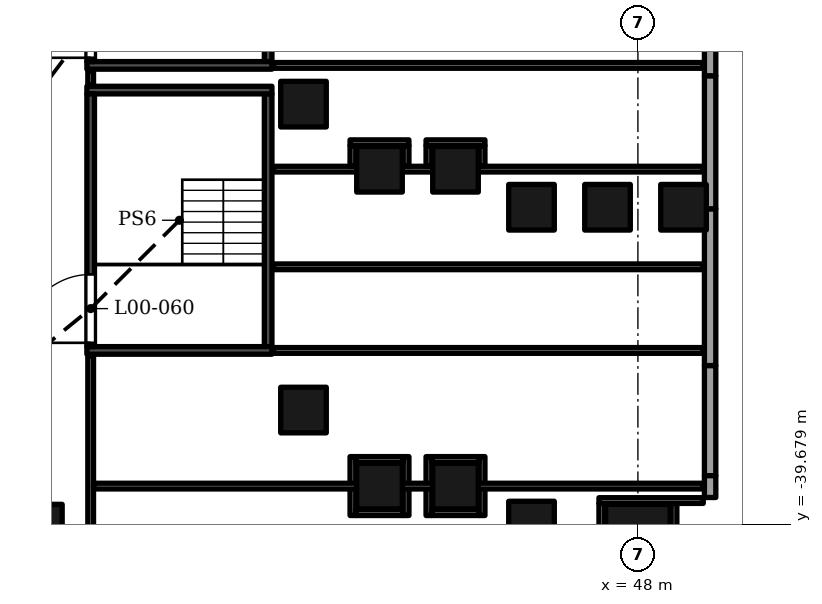
"""IFC4 building model, lengths in metres.
Left out: names, types, materials, properties, quantities, classifications, styles, units other than length and angle.
Written with IfcOpenShell. Run it as: python <this file> out.ifc"""

import sys

from ifc_helpers import new_model, si_unit, direction, frame, frame_2d, origin, origin_2d, place, context, subcontext, project, spatial, rectangle, extrude, element, fill, save


model = new_model("IFC4")
c1 = context("Model", 3, precision=1e-05, world=origin(), true_north=direction((0.0, 1.0)))
c2 = subcontext(c1, "Body", "Model", "MODEL_VIEW")
j1 = project(units=[si_unit("LENGTHUNIT", "METRE"), si_unit("PLANEANGLEUNIT", "RADIAN")], contexts=[c1])
p1 = place(None, origin())
s1 = spatial("IfcSite", under=j1, at=p1, CompositionType="ELEMENT")
p2 = place(p1, origin())
s2 = spatial("IfcBuilding", under=s1, at=p2, CompositionType="ELEMENT")
p3 = place(p2, origin())
s3 = spatial("IfcBuildingStorey", under=s2, at=p3, CompositionType="ELEMENT", Elevation=0.0)
for number, where, z_axis, x_axis in (
    (1, (32.0, -40.0, 0.0), (0.0, 0.0, 1.0), (1.0, 0.0, 0.0)),
    (2, (48.0, -40.0, 0.0), (0.0, 0.0, 1.0), (1.0, 0.0, 0.0)),
):
    element("IfcColumn", number, at=place(p3, frame(where, z_axis=z_axis, x_axis=x_axis)), inside=s3, PredefinedType="COLUMN", context=c2, shape_type="SweptSolid", body=[
        extrude(rectangle(XDim=1.7, YDim=1.7, at=origin_2d()), origin(), (0.0, 0.0, 1.0), 9.0),
    ])
for number, where, z_axis, x_axis in (
    (3, (39.2, -36.669, 0.0), (0.0, 0.0, 1.0), (1.0, 0.0, 0.0)),
    (4, (39.2, -28.62, 0.0), (0.0, 0.0, 1.0), (1.0, 0.0, 0.0)),
    (5, (41.2, -38.669, 0.0), (0.0, 0.0, 1.0), (1.0, 0.0, 0.0)),
    (6, (41.2, -30.333, 0.0), (0.0, 0.0, 1.0), (1.0, 0.0, 0.0)),
    (7, (43.2, -38.669, 0.0), (0.0, 0.0, 1.0), (1.0, 0.0, 0.0)),
    (8, (43.2, -30.333, 0.0), (0.0, 0.0, 1.0), (1.0, 0.0, 0.0)),
    (9, (45.2, -39.669, 0.0), (0.0, 0.0, 1.0), (1.0, 0.0, 0.0)),
    (10, (45.2, -31.333, 0.0), (0.0, 0.0, 1.0), (1.0, 0.0, 0.0)),
    (11, (47.2, -31.333, 0.0), (0.0, 0.0, 1.0), (1.0, 0.0, 0.0)),
    (12, (49.2, -31.333, 0.0), (0.0, 0.0, 1.0), (1.0, 0.0, 0.0)),
):
    element("IfcColumn", number, at=place(p3, frame(where, z_axis=z_axis, x_axis=x_axis)), inside=s3, PredefinedType="COLUMN", context=c2, shape_type="SweptSolid", body=[
        extrude(rectangle(XDim=1.2, YDim=1.2, at=origin_2d()), origin(), (0.0, 0.0, 1.0), 9.0),
    ])
p4 = place(p3, frame((49.9, -38.396, 0.0), z_axis=(0.0, 0.0, 1.0), x_axis=(0.0, 1.0, 0.0)))
e13 = element("IfcWall", 13, at=p4, inside=s3, PredefinedType="ELEMENTEDWALL", context=c2, shape_type="SweptSolid", body=[
    extrude(rectangle(XDim=2.898, YDim=0.3, at=frame_2d((1.449, 0.0))), origin(), (0.0, 0.0, 1.0), 7.6),
])
p5 = place(p4, frame((0.4, 0.0, 0.0)))
e14 = element("IfcOpeningElement", 14, at=p5, cuts=e13, PredefinedType="OPENING", context=c2, shape_type="SweptSolid", body=[
    extrude(rectangle(XDim=2.0, YDim=2.7, at=frame_2d((1.0, 1.35))), frame((0.0, 0.16, 0.0), z_axis=(0.0, -1.0, 0.0), x_axis=(1.0, 0.0, 0.0)), (0.0, 0.0, 1.0), 0.32),
])
p6 = place(p3, frame((49.9, -35.498, 0.0), z_axis=(0.0, 0.0, 1.0), x_axis=(0.0, 1.0, 0.0)))
e15 = element("IfcWall", 15, at=p6, inside=s3, PredefinedType="ELEMENTEDWALL", context=c2, shape_type="SweptSolid", body=[
    extrude(rectangle(XDim=4.125, YDim=0.3, at=frame_2d((2.062, 0.0))), origin(), (0.0, 0.0, 1.0), 7.6),
])
p7 = place(p6, frame((0.498, 0.0, 0.0)))
e16 = element("IfcOpeningElement", 16, at=p7, cuts=e15, PredefinedType="OPENING", context=c2, shape_type="SweptSolid", body=[
    extrude(rectangle(XDim=2.0, YDim=2.4, at=frame_2d((1.0, 1.2))), frame((0.0, 0.16, 0.0), z_axis=(0.0, -1.0, 0.0), x_axis=(1.0, 0.0, 0.0)), (0.0, 0.0, 1.0), 0.32),
])
p8 = place(p3, frame((49.9, -31.373, 0.0), z_axis=(0.0, 0.0, 1.0), x_axis=(0.0, 1.0, 0.0)))
e17 = element("IfcWall", 17, at=p8, inside=s3, PredefinedType="ELEMENTEDWALL", context=c2, shape_type="SweptSolid", body=[
    extrude(rectangle(XDim=3.5, YDim=0.3, at=frame_2d((1.75, 0.0))), origin(), (0.0, 0.0, 1.0), 7.6),
])
p9 = place(p8, frame((1.627, 0.0, 0.0)))
e18 = element("IfcOpeningElement", 18, at=p9, cuts=e17, PredefinedType="OPENING", context=c2, shape_type="SweptSolid", body=[
    extrude(rectangle(XDim=1.5, YDim=2.7, at=frame_2d((0.75, 1.35))), frame((0.0, 0.16, 0.0), z_axis=(0.0, -1.0, 0.0), x_axis=(1.0, 0.0, 0.0)), (0.0, 0.0, 1.0), 0.32),
])
p10 = place(p3, frame((49.9, -27.873, 0.0), z_axis=(0.0, 0.0, 1.0), x_axis=(0.0, 1.0, 0.0)))
e19 = element("IfcWall", 19, at=p10, inside=s3, PredefinedType="ELEMENTEDWALL", context=c2, shape_type="SweptSolid", body=[
    extrude(rectangle(XDim=4.375, YDim=0.3, at=frame_2d((2.188, 0.0))), origin(), (0.0, 0.0, 1.0), 7.6),
])
p11 = place(p10, frame((0.373, 0.0, 0.0)))
e20 = element("IfcOpeningElement", 20, at=p11, cuts=e19, PredefinedType="OPENING", context=c2, shape_type="SweptSolid", body=[
    extrude(rectangle(XDim=2.0, YDim=2.4, at=frame_2d((1.0, 1.2))), frame((0.0, 0.16, 0.0), z_axis=(0.0, -1.0, 0.0), x_axis=(1.0, 0.0, 0.0)), (0.0, 0.0, 1.0), 0.32),
])
p12 = place(p3, frame((49.9, -38.97, 0.0), z_axis=(0.0, 0.0, 1.0), x_axis=(0.0, 1.0, 0.0)))
e21 = element("IfcWall", 21, at=p12, inside=s3, PredefinedType="SOLIDWALL", context=c2, shape_type="SweptSolid", body=[
    extrude(rectangle(XDim=0.574, YDim=0.3, at=frame_2d((0.287, 0.0))), origin(), (0.0, 0.0, 1.0), 7.6),
])
p13 = place(p3, frame((49.85, -39.79, 9.0), z_axis=(0.0, 0.0, 1.0), x_axis=(0.0, 1.0, 0.0)))
e22 = element("IfcWall", 22, at=p13, inside=s3, PredefinedType="PARAPET", context=c2, shape_type="SweptSolid", body=[
    extrude(rectangle(XDim=14.698, YDim=0.3, at=frame_2d((7.349, 0.0))), origin(), (0.0, 0.0, 1.0), 1.1),
])
for number, where, z_axis, x_axis in (
    (23, (33.5, -35.1, 0.0), (0.0, 0.0, 1.0), (1.0, 0.0, 0.0)),
    (24, (33.5, -28.25, 0.0), (0.0, 0.0, 1.0), (1.0, 0.0, 0.0)),
):
    element("IfcWall", number, at=place(p3, frame(where, z_axis=z_axis, x_axis=x_axis)), inside=s3, PredefinedType="SOLIDWALL", context=c2, shape_type="SweptSolid", body=[
        extrude(rectangle(XDim=4.87, YDim=0.2, at=frame_2d((2.435, 0.0))), origin(), (0.0, 0.0, 1.0), 8.5),
    ])
p14 = place(p3, frame((33.6, -35.0, 0.0), z_axis=(0.0, 0.0, 1.0), x_axis=(0.0, 1.0, 0.0)))
e25 = element("IfcWall", 25, at=p14, inside=s3, PredefinedType="SOLIDWALL", context=c2, shape_type="SweptSolid", body=[
    extrude(rectangle(XDim=6.65, YDim=0.2, at=frame_2d((3.325, 0.0))), origin(), (0.0, 0.0, 1.0), 8.5),
])
p15 = place(p14, frame((0.1, 0.0, 0.0)))
e26 = element("IfcOpeningElement", 26, at=p15, cuts=e25, PredefinedType="OPENING", context=c2, shape_type="SweptSolid", body=[
    extrude(rectangle(XDim=1.8, YDim=2.4, at=frame_2d((0.9, 1.2))), frame((0.0, 0.11, 0.0), z_axis=(0.0, -1.0, 0.0), x_axis=(1.0, 0.0, 0.0)), (0.0, 0.0, 1.0), 0.22),
])
p16 = place(p3, frame((38.27, -35.0, 0.0), z_axis=(0.0, 0.0, 1.0), x_axis=(0.0, 1.0, 0.0)))
e27 = element("IfcWall", 27, at=p16, inside=s3, PredefinedType="SOLIDWALL", context=c2, shape_type="SweptSolid", body=[
    extrude(rectangle(XDim=6.65, YDim=0.2, at=frame_2d((3.325, 0.0))), origin(), (0.0, 0.0, 1.0), 8.5),
])
p17 = place(p16, frame((0.1, 0.0, 0.0)))
e28 = element("IfcOpeningElement", 28, at=p17, cuts=e27, PredefinedType="OPENING", context=c2, shape_type="SweptSolid", body=[
    extrude(rectangle(XDim=1.8, YDim=2.4, at=frame_2d((0.9, 1.2))), frame((0.0, 0.11, 0.0), z_axis=(0.0, -1.0, 0.0), x_axis=(1.0, 0.0, 0.0)), (0.0, 0.0, 1.0), 0.22),
])
p18 = place(p3, frame((33.5, -27.6, 0.0), z_axis=(0.0, 0.0, 1.0), x_axis=(1.0, 0.0, 0.0)))
e29 = element("IfcWall", 29, at=p18, inside=s3, PredefinedType="SOLIDWALL", context=c2, shape_type="SweptSolid", body=[
    extrude(rectangle(XDim=4.87, YDim=0.2, at=frame_2d((2.435, 0.0))), origin(), (0.0, 0.0, 1.0), 8.5),
])
p19 = place(p3, frame((33.6, -27.5, 0.0), z_axis=(0.0, 0.0, 1.0), x_axis=(0.0, 1.0, 0.0)))
e30 = element("IfcWall", 30, at=p19, inside=s3, PredefinedType="SOLIDWALL", context=c2, shape_type="SweptSolid", body=[
    extrude(rectangle(XDim=6.65, YDim=0.2, at=frame_2d((3.325, 0.0))), origin(), (0.0, 0.0, 1.0), 8.5),
])
p20 = place(p19, frame((0.1, 0.0, 0.0)))
e31 = element("IfcOpeningElement", 31, at=p20, cuts=e30, PredefinedType="OPENING", context=c2, shape_type="SweptSolid", body=[
    extrude(rectangle(XDim=1.8, YDim=2.4, at=frame_2d((0.9, 1.2))), frame((0.0, 0.11, 0.0), z_axis=(0.0, -1.0, 0.0), x_axis=(1.0, 0.0, 0.0)), (0.0, 0.0, 1.0), 0.22),
])
p21 = place(p3, frame((38.27, -27.5, 0.0), z_axis=(0.0, 0.0, 1.0), x_axis=(0.0, 1.0, 0.0)))
e32 = element("IfcWall", 32, at=p21, inside=s3, PredefinedType="SOLIDWALL", context=c2, shape_type="SweptSolid", body=[
    extrude(rectangle(XDim=6.65, YDim=0.2, at=frame_2d((3.325, 0.0))), origin(), (0.0, 0.0, 1.0), 8.5),
])
p22 = place(p21, frame((0.1, 0.0, 0.0)))
e33 = element("IfcOpeningElement", 33, at=p22, cuts=e32, PredefinedType="OPENING", context=c2, shape_type="SweptSolid", body=[
    extrude(rectangle(XDim=1.8, YDim=2.4, at=frame_2d((0.9, 1.2))), frame((0.0, 0.11, 0.0), z_axis=(0.0, -1.0, 0.0), x_axis=(1.0, 0.0, 0.0)), (0.0, 0.0, 1.0), 0.22),
])
p23 = place(p3, frame((33.6, -44.6, 0.0), z_axis=(0.0, 0.0, 1.0), x_axis=(0.0, 1.0, 0.0)))
e34 = element("IfcWall", 34, at=p23, inside=s3, PredefinedType="PARTITIONING", context=c2, shape_type="SweptSolid", body=[
    extrude(rectangle(XDim=9.36, YDim=0.15, at=frame_2d((4.68, 0.0))), origin(), (0.0, 0.0, 1.0), 7.3),
])
p24 = place(p23, frame((6.68, 0.0, 0.0)))
e35 = element("IfcOpeningElement", 35, at=p24, cuts=e34, PredefinedType="OPENING", context=c2, shape_type="SweptSolid", body=[
    extrude(rectangle(XDim=1.2, YDim=2.1, at=frame_2d((0.6, 1.05))), frame((0.0, 0.085, 0.0), z_axis=(0.0, -1.0, 0.0), x_axis=(1.0, 0.0, 0.0)), (0.0, 0.0, 1.0), 0.17),
])
p25 = place(p3, frame((47.05, -40.875, 0.0), z_axis=(0.0, 0.0, 1.0), x_axis=(0.0, 1.0, 0.0)))
e36 = element("IfcWall", 36, at=p25, inside=s3, PredefinedType="PARTITIONING", context=c2, shape_type="SweptSolid", body=[
    extrude(rectangle(XDim=1.75, YDim=0.15, at=frame_2d((0.875, 0.0))), origin(), (0.0, 0.0, 1.0), 7.6),
])
p26 = place(p3, frame((48.95, -40.646, 0.0), z_axis=(0.0, 0.0, 1.0), x_axis=(0.0, 1.0, 0.0)))
e37 = element("IfcWall", 37, at=p26, inside=s3, PredefinedType="PARTITIONING", context=c2, shape_type="SweptSolid", body=[
    extrude(rectangle(XDim=1.521, YDim=0.15, at=frame_2d((0.76, 0.0))), origin(), (0.0, 0.0, 1.0), 8.5),
])
p27 = place(p3, frame((40.5, -39.444, 0.0), z_axis=(0.0, 0.0, 1.0), x_axis=(0.0, 1.0, 0.0)))
e38 = element("IfcWall", 38, at=p27, inside=s3, PredefinedType="PARTITIONING", context=c2, shape_type="SweptSolid", body=[
    extrude(rectangle(XDim=1.55, YDim=0.15, at=frame_2d((0.775, 0.0))), origin(), (0.0, 0.0, 1.0), 8.5),
])
p28 = place(p3, frame((40.575, -39.369, 0.0), z_axis=(0.0, 0.0, 1.0), x_axis=(1.0, 0.0, 0.0)))
e39 = element("IfcWall", 39, at=p28, inside=s3, PredefinedType="PARTITIONING", context=c2, shape_type="SweptSolid", body=[
    extrude(rectangle(XDim=1.25, YDim=0.15, at=frame_2d((0.625, 0.0))), origin(), (0.0, 0.0, 1.0), 8.5),
])
for number, where, z_axis, x_axis in (
    (40, (41.9, -39.444, 0.0), (0.0, 0.0, 1.0), (0.0, 1.0, 0.0)),
    (41, (42.5, -39.444, 0.0), (0.0, 0.0, 1.0), (0.0, 1.0, 0.0)),
):
    element("IfcWall", number, at=place(p3, frame(where, z_axis=z_axis, x_axis=x_axis)), inside=s3, PredefinedType="PARTITIONING", context=c2, shape_type="SweptSolid", body=[
        extrude(rectangle(XDim=1.55, YDim=0.15, at=frame_2d((0.775, 0.0))), origin(), (0.0, 0.0, 1.0), 8.5),
    ])
p29 = place(p3, frame((42.575, -39.369, 0.0), z_axis=(0.0, 0.0, 1.0), x_axis=(1.0, 0.0, 0.0)))
e42 = element("IfcWall", 42, at=p29, inside=s3, PredefinedType="PARTITIONING", context=c2, shape_type="SweptSolid", body=[
    extrude(rectangle(XDim=1.25, YDim=0.15, at=frame_2d((0.625, 0.0))), origin(), (0.0, 0.0, 1.0), 8.5),
])
p30 = place(p3, frame((43.9, -39.444, 0.0), z_axis=(0.0, 0.0, 1.0), x_axis=(0.0, 1.0, 0.0)))
e43 = element("IfcWall", 43, at=p30, inside=s3, PredefinedType="PARTITIONING", context=c2, shape_type="SweptSolid", body=[
    extrude(rectangle(XDim=1.55, YDim=0.15, at=frame_2d((0.775, 0.0))), origin(), (0.0, 0.0, 1.0), 8.5),
])
p31 = place(p3, frame((46.975, -39.05, 0.0), z_axis=(0.0, 0.0, 1.0), x_axis=(1.0, 0.0, 0.0)))
e44 = element("IfcWall", 44, at=p31, inside=s3, PredefinedType="PARTITIONING", context=c2, shape_type="SweptSolid", body=[
    extrude(rectangle(XDim=2.745, YDim=0.15, at=frame_2d((1.373, 0.0))), origin(), (0.0, 0.0, 1.0), 7.6),
])
p32 = place(p3, frame((33.675, -38.67, 0.0), z_axis=(0.0, 0.0, 1.0), x_axis=(1.0, 0.0, 0.0)))
e45 = element("IfcWall", 45, at=p32, inside=s3, PredefinedType="PARTITIONING", context=c2, shape_type="SweptSolid", body=[
    extrude(rectangle(XDim=6.925, YDim=0.15, at=frame_2d((3.462, 0.0))), origin(), (0.0, 0.0, 1.0), 8.5),
])
p33 = place(p3, frame((41.8, -38.67, 0.0), z_axis=(0.0, 0.0, 1.0), x_axis=(1.0, 0.0, 0.0)))
e46 = element("IfcWall", 46, at=p33, inside=s3, PredefinedType="PARTITIONING", context=c2, shape_type="SweptSolid", body=[
    extrude(rectangle(XDim=0.8, YDim=0.15, at=frame_2d((0.4, 0.0))), origin(), (0.0, 0.0, 1.0), 8.5),
])
p34 = place(p3, frame((43.8, -38.67, 0.0), z_axis=(0.0, 0.0, 1.0), x_axis=(1.0, 0.0, 0.0)))
e47 = element("IfcWall", 47, at=p34, inside=s3, PredefinedType="PARTITIONING", context=c2, shape_type="SweptSolid", body=[
    extrude(rectangle(XDim=5.92, YDim=0.15, at=frame_2d((2.96, 0.0))), origin(), (0.0, 0.0, 1.0), 7.6),
])
for number, where, z_axis, x_axis in (
    (48, (40.575, -37.969, 0.0), (0.0, 0.0, 1.0), (1.0, 0.0, 0.0)),
    (49, (42.575, -37.969, 0.0), (0.0, 0.0, 1.0), (1.0, 0.0, 0.0)),
):
    element("IfcWall", number, at=place(p3, frame(where, z_axis=z_axis, x_axis=x_axis)), inside=s3, PredefinedType="PARTITIONING", context=c2, shape_type="SweptSolid", body=[
        extrude(rectangle(XDim=1.25, YDim=0.15, at=frame_2d((0.625, 0.0))), origin(), (0.0, 0.0, 1.0), 8.5),
    ])
p35 = place(p3, frame((38.41, -35.101, 0.0), z_axis=(0.0, 0.0, 1.0), x_axis=(1.0, 0.0, 0.0)))
e50 = element("IfcWall", 50, at=p35, inside=s3, PredefinedType="PARTITIONING", context=c2, shape_type="SweptSolid", body=[
    extrude(rectangle(XDim=11.31, YDim=0.151, at=frame_2d((5.655, 0.0))), origin(), (0.0, 0.0, 1.0), 7.6),
])
p36 = place(p35, frame((5.04, 0.0, 0.0)))
e51 = element("IfcOpeningElement", 51, at=p36, cuts=e50, PredefinedType="OPENING", context=c2, shape_type="SweptSolid", body=[
    extrude(rectangle(XDim=1.2, YDim=2.1, at=frame_2d((0.6, 1.05))), frame((0.0, 0.085, 0.0), z_axis=(0.0, -1.0, 0.0), x_axis=(1.0, 0.0, 0.0)), (0.0, 0.0, 1.0), 0.171),
])
p37 = place(p3, frame((38.41, -32.9, 0.0), z_axis=(0.0, 0.0, 1.0), x_axis=(1.0, 0.0, 0.0)))
e52 = element("IfcWall", 52, at=p37, inside=s3, PredefinedType="PARTITIONING", context=c2, shape_type="SweptSolid", body=[
    extrude(rectangle(XDim=11.31, YDim=0.15, at=frame_2d((5.655, 0.0))), origin(), (0.0, 0.0, 1.0), 7.6),
])
p38 = place(p3, frame((38.41, -30.33, 0.0), z_axis=(0.0, 0.0, 1.0), x_axis=(1.0, 0.0, 0.0)))
e53 = element("IfcWall", 53, at=p38, inside=s3, PredefinedType="PARTITIONING", context=c2, shape_type="SweptSolid", body=[
    extrude(rectangle(XDim=2.19, YDim=0.15, at=frame_2d((1.095, 0.0))), origin(), (0.0, 0.0, 1.0), 8.5),
])
p39 = place(p3, frame((41.8, -30.33, 0.0), z_axis=(0.0, 0.0, 1.0), x_axis=(1.0, 0.0, 0.0)))
e54 = element("IfcWall", 54, at=p39, inside=s3, PredefinedType="PARTITIONING", context=c2, shape_type="SweptSolid", body=[
    extrude(rectangle(XDim=0.8, YDim=0.15, at=frame_2d((0.4, 0.0))), origin(), (0.0, 0.0, 1.0), 8.5),
])
p40 = place(p3, frame((43.8, -30.33, 0.0), z_axis=(0.0, 0.0, 1.0), x_axis=(1.0, 0.0, 0.0)))
e55 = element("IfcWall", 55, at=p40, inside=s3, PredefinedType="PARTITIONING", context=c2, shape_type="SweptSolid", body=[
    extrude(rectangle(XDim=5.92, YDim=0.15, at=frame_2d((2.96, 0.0))), origin(), (0.0, 0.0, 1.0), 7.6),
])
for number, where, z_axis, x_axis in (
    (56, (40.5, -30.255, 0.0), (0.0, 0.0, 1.0), (0.0, 1.0, 0.0)),
    (57, (41.9, -30.255, 0.0), (0.0, 0.0, 1.0), (0.0, 1.0, 0.0)),
    (58, (42.5, -30.255, 0.0), (0.0, 0.0, 1.0), (0.0, 1.0, 0.0)),
    (59, (43.9, -30.255, 0.0), (0.0, 0.0, 1.0), (0.0, 1.0, 0.0)),
):
    element("IfcWall", number, at=place(p3, frame(where, z_axis=z_axis, x_axis=x_axis)), inside=s3, PredefinedType="PARTITIONING", context=c2, shape_type="SweptSolid", body=[
        extrude(rectangle(XDim=0.545, YDim=0.15, at=frame_2d((0.272, 0.0))), origin(), (0.0, 0.0, 1.0), 8.5),
    ])
for number, where, z_axis, x_axis in (
    (60, (40.425, -29.635, 0.0), (0.0, 0.0, 1.0), (1.0, 0.0, 0.0)),
    (61, (42.425, -29.635, 0.0), (0.0, 0.0, 1.0), (1.0, 0.0, 0.0)),
):
    element("IfcWall", number, at=place(p3, frame(where, z_axis=z_axis, x_axis=x_axis)), inside=s3, PredefinedType="PARTITIONING", context=c2, shape_type="SweptSolid", body=[
        extrude(rectangle(XDim=1.55, YDim=0.15, at=frame_2d((0.775, 0.0))), origin(), (0.0, 0.0, 1.0), 8.5),
    ])
p41 = place(p3, frame((33.6, -28.11, 0.0), z_axis=(0.0, 0.0, 1.0), x_axis=(0.0, 1.0, 0.0)))
e62 = element("IfcWall", 62, at=p41, inside=s3, PredefinedType="PARTITIONING", context=c2, shape_type="SweptSolid", body=[
    extrude(rectangle(XDim=0.37, YDim=0.15, at=frame_2d((0.185, 0.0))), origin(), (0.0, 0.0, 1.0), 8.5),
])
p42 = place(p3, frame((38.41, -27.601, 0.0), z_axis=(0.0, 0.0, 1.0), x_axis=(1.0, 0.0, 0.0)))
e63 = element("IfcWall", 63, at=p42, inside=s3, PredefinedType="PARTITIONING", context=c2, shape_type="SweptSolid", body=[
    extrude(rectangle(XDim=11.31, YDim=0.151, at=frame_2d((5.655, 0.0))), origin(), (0.0, 0.0, 1.0), 7.6),
])
p43 = place(p42, frame((5.04, 0.0, 0.0)))
e64 = element("IfcOpeningElement", 64, at=p43, cuts=e63, PredefinedType="OPENING", context=c2, shape_type="SweptSolid", body=[
    extrude(rectangle(XDim=1.2, YDim=2.1, at=frame_2d((0.6, 1.05))), frame((0.0, 0.085, 0.0), z_axis=(0.0, -1.0, 0.0), x_axis=(1.0, 0.0, 0.0)), (0.0, 0.0, 1.0), 0.171),
])
p44 = place(p5, origin())
e65 = element("IfcDoor", 65, at=p44, inside=s3, OperationType="DOUBLE_DOOR_SINGLE_SWING", PredefinedType="DOOR", context=c2, shape_type="SweptSolid", body=[
    extrude(rectangle(XDim=2.0, YDim=2.7, at=frame_2d((1.0, 1.35))), frame((0.0, 0.025, 0.0), z_axis=(0.0, -1.0, 0.0), x_axis=(1.0, 0.0, 0.0)), (0.0, 0.0, 1.0), 0.05),
])
fill(e14, e65)
p45 = place(p7, origin())
e66 = element("IfcDoor", 66, at=p45, inside=s3, OperationType="DOUBLE_DOOR_SINGLE_SWING", PredefinedType="DOOR", context=c2, shape_type="SweptSolid", body=[
    extrude(rectangle(XDim=2.0, YDim=2.4, at=frame_2d((1.0, 1.2))), frame((0.0, 0.025, 0.0), z_axis=(0.0, -1.0, 0.0), x_axis=(1.0, 0.0, 0.0)), (0.0, 0.0, 1.0), 0.05),
])
fill(e16, e66)
p46 = place(p9, origin())
e67 = element("IfcDoor", 67, at=p46, inside=s3, OperationType="DOUBLE_DOOR_SINGLE_SWING", PredefinedType="DOOR", context=c2, shape_type="SweptSolid", body=[
    extrude(rectangle(XDim=1.5, YDim=2.7, at=frame_2d((0.75, 1.35))), frame((0.0, 0.025, 0.0), z_axis=(0.0, -1.0, 0.0), x_axis=(1.0, 0.0, 0.0)), (0.0, 0.0, 1.0), 0.05),
])
fill(e18, e67)
p47 = place(p11, origin())
e68 = element("IfcDoor", 68, at=p47, inside=s3, OperationType="DOUBLE_DOOR_SINGLE_SWING", PredefinedType="DOOR", context=c2, shape_type="SweptSolid", body=[
    extrude(rectangle(XDim=2.0, YDim=2.4, at=frame_2d((1.0, 1.2))), frame((0.0, 0.025, 0.0), z_axis=(0.0, -1.0, 0.0), x_axis=(1.0, 0.0, 0.0)), (0.0, 0.0, 1.0), 0.05),
])
fill(e20, e68)
p48 = place(p15, origin())
e69 = element("IfcDoor", 69, at=p48, inside=s3, OperationType="DOUBLE_DOOR_SINGLE_SWING", PredefinedType="DOOR", context=c2, shape_type="SweptSolid", body=[
    extrude(rectangle(XDim=1.8, YDim=2.4, at=frame_2d((0.9, 1.2))), frame((0.0, 0.025, 0.0), z_axis=(0.0, -1.0, 0.0), x_axis=(1.0, 0.0, 0.0)), (0.0, 0.0, 1.0), 0.05),
])
fill(e26, e69)
p49 = place(p17, origin())
e70 = element("IfcDoor", 70, at=p49, inside=s3, OperationType="DOUBLE_DOOR_SINGLE_SWING", PredefinedType="DOOR", context=c2, shape_type="SweptSolid", body=[
    extrude(rectangle(XDim=1.8, YDim=2.4, at=frame_2d((0.9, 1.2))), frame((0.0, 0.025, 0.0), z_axis=(0.0, -1.0, 0.0), x_axis=(1.0, 0.0, 0.0)), (0.0, 0.0, 1.0), 0.05),
])
fill(e28, e70)
p50 = place(p20, origin())
e71 = element("IfcDoor", 71, at=p50, inside=s3, OperationType="DOUBLE_DOOR_SINGLE_SWING", PredefinedType="DOOR", context=c2, shape_type="SweptSolid", body=[
    extrude(rectangle(XDim=1.8, YDim=2.4, at=frame_2d((0.9, 1.2))), frame((0.0, 0.025, 0.0), z_axis=(0.0, -1.0, 0.0), x_axis=(1.0, 0.0, 0.0)), (0.0, 0.0, 1.0), 0.05),
])
fill(e31, e71)
p51 = place(p22, origin())
e72 = element("IfcDoor", 72, at=p51, inside=s3, OperationType="DOUBLE_DOOR_SINGLE_SWING", PredefinedType="DOOR", context=c2, shape_type="SweptSolid", body=[
    extrude(rectangle(XDim=1.8, YDim=2.4, at=frame_2d((0.9, 1.2))), frame((0.0, 0.025, 0.0), z_axis=(0.0, -1.0, 0.0), x_axis=(1.0, 0.0, 0.0)), (0.0, 0.0, 1.0), 0.05),
])
fill(e33, e72)
p52 = place(p24, origin())
e73 = element("IfcDoor", 73, at=p52, inside=s3, OperationType="SINGLE_SWING_LEFT", PredefinedType="DOOR", context=c2, shape_type="SweptSolid", body=[
    extrude(rectangle(XDim=1.2, YDim=2.1, at=frame_2d((0.6, 1.05))), frame((0.0, 0.025, 0.0), z_axis=(0.0, -1.0, 0.0), x_axis=(1.0, 0.0, 0.0)), (0.0, 0.0, 1.0), 0.05),
])
fill(e35, e73)
p53 = place(p36, origin())
e74 = element("IfcDoor", 74, at=p53, inside=s3, OperationType="SINGLE_SWING_LEFT", PredefinedType="DOOR", context=c2, shape_type="SweptSolid", body=[
    extrude(rectangle(XDim=1.2, YDim=2.1, at=frame_2d((0.6, 1.05))), frame((0.0, 0.025, 0.0), z_axis=(0.0, -1.0, 0.0), x_axis=(1.0, 0.0, 0.0)), (0.0, 0.0, 1.0), 0.05),
])
fill(e51, e74)
p54 = place(p43, origin())
e75 = element("IfcDoor", 75, at=p54, inside=s3, OperationType="SINGLE_SWING_LEFT", PredefinedType="DOOR", context=c2, shape_type="SweptSolid", body=[
    extrude(rectangle(XDim=1.2, YDim=2.1, at=frame_2d((0.6, 1.05))), frame((0.0, 0.025, 0.0), z_axis=(0.0, -1.0, 0.0), x_axis=(1.0, 0.0, 0.0)), (0.0, 0.0, 1.0), 0.05),
])
fill(e64, e75)
save(model, sys.argv[1])
